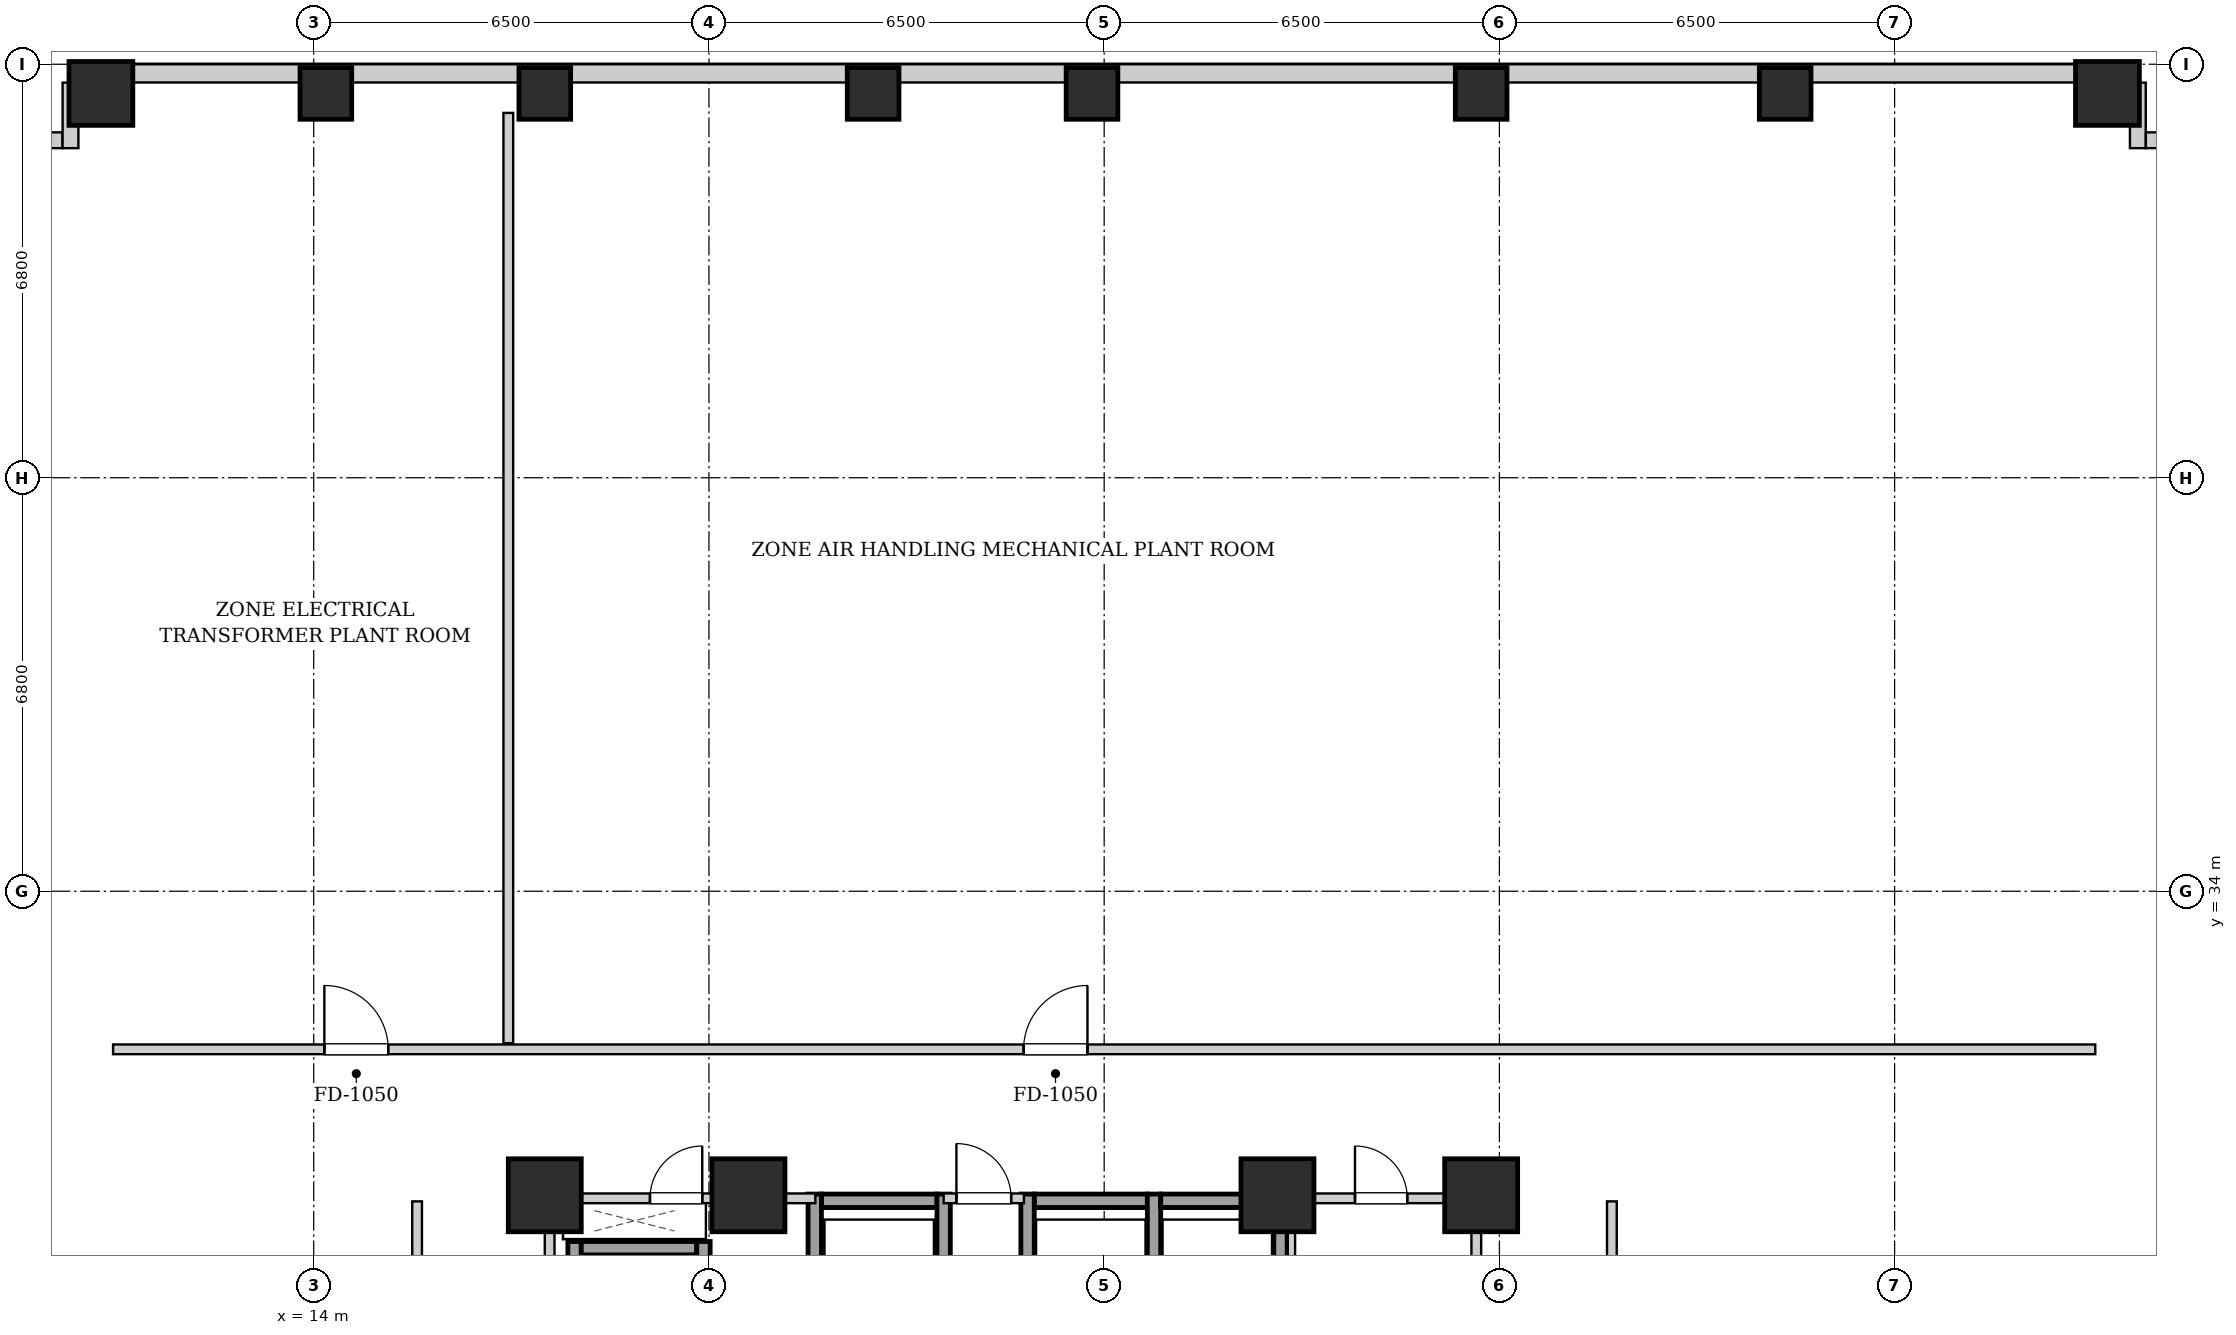
"""IFC4 building model, lengths in metres.
Left out: names, types, materials, properties, quantities, classifications, styles, units other than length and angle.
Written with IfcOpenShell. Run it as: python <this file> out.ifc"""

import sys

from ifc_helpers import new_model, si_unit, direction, frame, frame_2d, origin, origin_2d, place, context, subcontext, project, spatial, rectangle, extrude, element, fill, save


model = new_model("IFC4")
c1 = context("Model", 3, precision=1e-05, world=origin(), true_north=direction((0.0, 1.0)))
c2 = subcontext(c1, "Body", "Model", "MODEL_VIEW")
j1 = project(units=[si_unit("LENGTHUNIT", "METRE"), si_unit("PLANEANGLEUNIT", "RADIAN")], contexts=[c1])
p1 = place(None, origin())
s1 = spatial("IfcSite", under=j1, at=p1, CompositionType="ELEMENT")
p2 = place(p1, origin())
s2 = spatial("IfcBuilding", under=s1, at=p2, CompositionType="ELEMENT")
p3 = place(p2, frame((0.0, 0.0, 70.6)))
s3 = spatial("IfcBuildingStorey", under=s2, at=p3, CompositionType="ELEMENT", Elevation=70.6)
p4 = place(p3, frame((10.5, 47.12, 0.0), z_axis=(0.0, 0.0, 1.0), x_axis=(1.0, 0.0, 0.0)))
e1 = element("IfcColumn", 1, at=p4, inside=s3, PredefinedType="COLUMN", context=c2, shape_type="SweptSolid", body=[
    extrude(rectangle(XDim=1.05, YDim=1.05, at=origin_2d()), origin(), (0.0, 0.0, 1.0), 4.5),
])
for number, where, z_axis, x_axis in (
    (2, (14.2, 47.12, 0.0), (0.0, 0.0, 1.0), (1.0, 0.0, 0.0)),
    (3, (17.8, 47.12, 0.0), (0.0, 0.0, 1.0), (1.0, 0.0, 0.0)),
    (4, (23.2, 47.12, 0.0), (0.0, 0.0, 1.0), (1.0, 0.0, 0.0)),
    (5, (26.8, 47.12, 0.0), (0.0, 0.0, 1.0), (1.0, 0.0, 0.0)),
    (6, (33.2, 47.12, 0.0), (0.0, 0.0, 1.0), (1.0, 0.0, 0.0)),
    (7, (38.2, 47.12, 0.0), (0.0, 0.0, 1.0), (1.0, 0.0, 0.0)),
):
    element("IfcColumn", number, at=place(p3, frame(where, z_axis=z_axis, x_axis=x_axis)), inside=s3, PredefinedType="COLUMN", context=c2, shape_type="SweptSolid", body=[
        extrude(rectangle(XDim=0.85, YDim=0.85, at=origin_2d()), origin(), (0.0, 0.0, 1.0), 4.5),
    ])
p5 = place(p3, frame((43.5, 47.12, 0.0), z_axis=(0.0, 0.0, 1.0), x_axis=(1.0, 0.0, 0.0)))
e8 = element("IfcColumn", 8, at=p5, inside=s3, PredefinedType="COLUMN", context=c2, shape_type="SweptSolid", body=[
    extrude(rectangle(XDim=1.05, YDim=1.05, at=origin_2d()), origin(), (0.0, 0.0, 1.0), 4.5),
])
for number, where, z_axis, x_axis in (
    (9, (17.8, 29.0, 0.0), (0.0, 0.0, 1.0), (1.0, 0.0, 0.0)),
    (10, (21.15, 29.0, 0.0), (0.0, 0.0, 1.0), (1.0, 0.0, 0.0)),
    (11, (29.85, 29.0, 0.0), (0.0, 0.0, 1.0), (1.0, 0.0, 0.0)),
    (12, (33.2, 29.0, 0.0), (0.0, 0.0, 1.0), (1.0, 0.0, 0.0)),
):
    element("IfcColumn", number, at=place(p3, frame(where, z_axis=z_axis, x_axis=x_axis)), inside=s3, PredefinedType="COLUMN", context=c2, shape_type="SweptSolid", body=[
        extrude(rectangle(XDim=1.2, YDim=1.2, at=origin_2d()), origin(), (0.0, 0.0, 1.0), 4.5),
    ])
p6 = place(p3, frame((10.0, 47.45, 0.0), z_axis=(0.0, 0.0, 1.0), x_axis=(1.0, 0.0, 0.0)))
e13 = element("IfcWall", 13, at=p6, inside=s3, PredefinedType="SOLIDWALL", context=c2, shape_type="SweptSolid", body=[
    extrude(rectangle(XDim=34.0, YDim=0.3, at=frame_2d((17.0, 0.0))), origin(), (0.0, 0.0, 1.0), 2.025),
])
p7 = place(p3, frame((8.882, 46.35, 0.0), z_axis=(0.0, 0.0, 1.0), x_axis=(1.0, 0.0, 0.0)))
e14 = element("IfcWall", 14, at=p7, inside=s3, PredefinedType="SOLIDWALL", context=c2, shape_type="SweptSolid", body=[
    extrude(rectangle(XDim=0.986, YDim=0.26, at=frame_2d((0.493, 0.0))), origin(), (0.0, 0.0, 1.0), 4.24),
])
for number, where, z_axis, x_axis in (
    (15, (10.0, 46.22, 0.0), (0.0, 0.0, 1.0), (0.0, 1.0, 0.0)),
    (16, (44.0, 47.298, 0.0), (0.0, 0.0, 1.0), (0.0, -1.0, 0.0)),
):
    element("IfcWall", number, at=place(p3, frame(where, z_axis=z_axis, x_axis=x_axis)), inside=s3, PredefinedType="SOLIDWALL", context=c2, shape_type="SweptSolid", body=[
        extrude(rectangle(XDim=1.078, YDim=0.26, at=frame_2d((0.539, 0.0))), origin(), (0.0, 0.0, 1.0), 4.24),
    ])
p8 = place(p3, frame((44.132, 46.35, 0.0), z_axis=(0.0, 0.0, 1.0), x_axis=(1.0, 0.0, 0.0)))
e17 = element("IfcWall", 17, at=p8, inside=s3, PredefinedType="SOLIDWALL", context=c2, shape_type="SweptSolid", body=[
    extrude(rectangle(XDim=1.248, YDim=0.26, at=frame_2d((0.624, 0.0))), origin(), (0.0, 0.0, 1.0), 4.24),
])
p9 = place(p3, frame((22.35, 28.91, 0.0), z_axis=(0.0, 0.0, 1.0), x_axis=(1.0, 0.0, 0.0)))
e18 = element("IfcWall", 18, at=p9, inside=s3, PredefinedType="SHEAR", context=c2, shape_type="SweptSolid", body=[
    extrude(rectangle(XDim=1.9, YDim=0.22, at=frame_2d((0.95, 0.0))), origin(), (0.0, 0.0, 1.0), 4.24),
])
for number, where, z_axis, x_axis in (
    (19, (22.24, 26.58, 0.0), (0.0, 0.0, 1.0), (0.0, 1.0, 0.0)),
    (20, (24.36, 26.58, 0.0), (0.0, 0.0, 1.0), (0.0, 1.0, 0.0)),
):
    element("IfcWall", number, at=place(p3, frame(where, z_axis=z_axis, x_axis=x_axis)), inside=s3, PredefinedType="SHEAR", context=c2, shape_type="SweptSolid", body=[
        extrude(rectangle(XDim=2.44, YDim=0.22, at=frame_2d((1.22, 0.0))), origin(), (0.0, 0.0, 1.0), 4.24),
    ])
p10 = place(p3, frame((25.85, 28.91, 0.0), z_axis=(0.0, 0.0, 1.0), x_axis=(1.0, 0.0, 0.0)))
e21 = element("IfcWall", 21, at=p10, inside=s3, PredefinedType="SHEAR", context=c2, shape_type="SweptSolid", body=[
    extrude(rectangle(XDim=1.86, YDim=0.22, at=frame_2d((0.93, 0.0))), origin(), (0.0, 0.0, 1.0), 4.24),
])
for number, where, z_axis, x_axis in (
    (22, (25.74, 26.58, 0.0), (0.0, 0.0, 1.0), (0.0, 1.0, 0.0)),
    (23, (27.82, 26.58, 0.0), (0.0, 0.0, 1.0), (0.0, 1.0, 0.0)),
):
    element("IfcWall", number, at=place(p3, frame(where, z_axis=z_axis, x_axis=x_axis)), inside=s3, PredefinedType="SHEAR", context=c2, shape_type="SweptSolid", body=[
        extrude(rectangle(XDim=2.44, YDim=0.22, at=frame_2d((1.22, 0.0))), origin(), (0.0, 0.0, 1.0), 4.24),
    ])
p11 = place(p3, frame((27.93, 28.91, 0.0), z_axis=(0.0, 0.0, 1.0), x_axis=(1.0, 0.0, 0.0)))
e24 = element("IfcWall", 24, at=p11, inside=s3, PredefinedType="SHEAR", context=c2, shape_type="SweptSolid", body=[
    extrude(rectangle(XDim=1.86, YDim=0.22, at=frame_2d((0.93, 0.0))), origin(), (0.0, 0.0, 1.0), 4.24),
])
p12 = place(p3, frame((29.9, 26.58, 0.0), z_axis=(0.0, 0.0, 1.0), x_axis=(0.0, 1.0, 0.0)))
e25 = element("IfcWall", 25, at=p12, inside=s3, PredefinedType="SHEAR", context=c2, shape_type="SweptSolid", body=[
    extrude(rectangle(XDim=2.44, YDim=0.22, at=frame_2d((1.22, 0.0))), origin(), (0.0, 0.0, 1.0), 4.24),
])
p13 = place(p3, frame((18.29, 24.1, 0.0), z_axis=(0.0, 0.0, 1.0), x_axis=(0.0, 1.0, 0.0)))
e26 = element("IfcWall", 26, at=p13, inside=s3, PredefinedType="SHEAR", context=c2, shape_type="SweptSolid", body=[
    extrude(rectangle(XDim=4.14, YDim=0.22, at=frame_2d((2.07, 0.0))), origin(), (0.0, 0.0, 1.0), 4.24),
])
p14 = place(p3, frame((18.4, 28.13, 0.0), z_axis=(0.0, 0.0, 1.0), x_axis=(1.0, 0.0, 0.0)))
e27 = element("IfcWall", 27, at=p14, inside=s3, PredefinedType="SHEAR", context=c2, shape_type="SweptSolid", body=[
    extrude(rectangle(XDim=1.9, YDim=0.22, at=frame_2d((0.95, 0.0))), origin(), (0.0, 0.0, 1.0), 4.24),
])
p15 = place(p3, frame((20.41, 26.06, 0.0), z_axis=(0.0, 0.0, 1.0), x_axis=(0.0, 1.0, 0.0)))
e28 = element("IfcWall", 28, at=p15, inside=s3, PredefinedType="SHEAR", context=c2, shape_type="SweptSolid", body=[
    extrude(rectangle(XDim=2.18, YDim=0.22, at=frame_2d((1.09, 0.0))), origin(), (0.0, 0.0, 1.0), 4.24),
])
for number, where, z_axis, x_axis in (
    (29, (17.88, 24.12, 0.0), (0.0, 0.0, 1.0), (0.0, 1.0, 0.0)),
    (30, (33.12, 24.12, 0.0), (0.0, 0.0, 1.0), (0.0, 1.0, 0.0)),
):
    element("IfcWall", number, at=place(p3, frame(where, z_axis=z_axis, x_axis=x_axis)), inside=s3, PredefinedType="PARTITIONING", context=c2, shape_type="SweptSolid", body=[
        extrude(rectangle(XDim=4.76, YDim=0.16, at=frame_2d((2.38, 0.0))), origin(), (0.0, 0.0, 1.0), 4.24),
    ])
p16 = place(p3, frame((24.36, 28.95, 0.0), z_axis=(0.0, 0.0, 1.0), x_axis=(1.0, 0.0, 0.0)))
e31 = element("IfcWall", 31, at=p16, inside=s3, PredefinedType="PARTITIONING", context=c2, shape_type="SweptSolid", body=[
    extrude(rectangle(XDim=1.32, YDim=0.16, at=frame_2d((0.66, 0.0))), origin(), (0.0, 0.0, 1.0), 4.24),
])
p17 = place(p16, frame((0.21, 0.0, 0.0)))
e32 = element("IfcOpeningElement", 32, at=p17, cuts=e31, PredefinedType="OPENING", context=c2, shape_type="SweptSolid", body=[
    extrude(rectangle(XDim=0.9, YDim=2.05, at=frame_2d((0.45, 1.025))), frame((0.0, 0.09, 0.0), z_axis=(0.0, -1.0, 0.0), x_axis=(1.0, 0.0, 0.0)), (0.0, 0.0, 1.0), 0.18),
])
p18 = place(p3, frame((17.96, 28.95, 0.0), z_axis=(0.0, 0.0, 1.0), x_axis=(1.0, 0.0, 0.0)))
e33 = element("IfcWall", 33, at=p18, inside=s3, PredefinedType="PARTITIONING", context=c2, shape_type="SweptSolid", body=[
    extrude(rectangle(XDim=4.29, YDim=0.16, at=frame_2d((2.145, 0.0))), origin(), (0.0, 0.0, 1.0), 4.24),
])
p19 = place(p18, frame((1.57, 0.0, 0.0)))
e34 = element("IfcOpeningElement", 34, at=p19, cuts=e33, PredefinedType="OPENING", context=c2, shape_type="SweptSolid", body=[
    extrude(rectangle(XDim=0.86, YDim=2.05, at=frame_2d((0.43, 1.025))), frame((0.0, 0.09, 0.0), z_axis=(0.0, -1.0, 0.0), x_axis=(1.0, 0.0, 0.0)), (0.0, 0.0, 1.0), 0.18),
])
p20 = place(p3, frame((30.08, 26.18, 0.0), z_axis=(0.0, 0.0, 1.0), x_axis=(0.0, 1.0, 0.0)))
e35 = element("IfcWall", 35, at=p20, inside=s3, PredefinedType="PARTITIONING", context=c2, shape_type="SweptSolid", body=[
    extrude(rectangle(XDim=2.68, YDim=0.12, at=frame_2d((1.34, 0.0))), origin(), (0.0, 0.0, 1.0), 4.24),
])
p21 = place(p3, frame((30.08, 28.95, 0.0), z_axis=(0.0, 0.0, 1.0), x_axis=(1.0, 0.0, 0.0)))
e36 = element("IfcWall", 36, at=p21, inside=s3, PredefinedType="PARTITIONING", context=c2, shape_type="SweptSolid", body=[
    extrude(rectangle(XDim=2.96, YDim=0.16, at=frame_2d((1.48, 0.0))), origin(), (0.0, 0.0, 1.0), 4.24),
])
p22 = place(p21, frame((1.045, 0.0, 0.0)))
e37 = element("IfcOpeningElement", 37, at=p22, cuts=e36, PredefinedType="OPENING", context=c2, shape_type="SweptSolid", body=[
    extrude(rectangle(XDim=0.86, YDim=2.05, at=frame_2d((0.43, 1.025))), frame((0.0, 0.09, 0.0), z_axis=(0.0, -1.0, 0.0), x_axis=(1.0, 0.0, 0.0)), (0.0, 0.0, 1.0), 0.18),
])
p23 = place(p3, frame((10.7, 31.4, 0.0), z_axis=(0.0, 0.0, 1.0), x_axis=(1.0, 0.0, 0.0)))
e38 = element("IfcWall", 38, at=p23, inside=s3, PredefinedType="PARTITIONING", context=c2, shape_type="SweptSolid", body=[
    extrude(rectangle(XDim=32.6, YDim=0.16, at=frame_2d((16.3, 0.0))), origin(), (0.0, 0.0, 1.0), 4.24),
])
p24 = place(p23, frame((3.475, 0.0, 0.0)))
e39 = element("IfcOpeningElement", 39, at=p24, cuts=e38, PredefinedType="OPENING", context=c2, shape_type="SweptSolid", body=[
    extrude(rectangle(XDim=1.05, YDim=2.05, at=frame_2d((0.525, 1.025))), frame((0.0, 0.09, 0.0), z_axis=(0.0, -1.0, 0.0), x_axis=(1.0, 0.0, 0.0)), (0.0, 0.0, 1.0), 0.18),
])
p25 = place(p23, frame((14.975, 0.0, 0.0)))
e40 = element("IfcOpeningElement", 40, at=p25, cuts=e38, PredefinedType="OPENING", context=c2, shape_type="SweptSolid", body=[
    extrude(rectangle(XDim=1.05, YDim=2.05, at=frame_2d((0.525, 1.025))), frame((0.0, 0.09, 0.0), z_axis=(0.0, -1.0, 0.0), x_axis=(1.0, 0.0, 0.0)), (0.0, 0.0, 1.0), 0.18),
])
p26 = place(p3, frame((17.2, 31.5, 0.0), z_axis=(0.0, 0.0, 1.0), x_axis=(0.0, 1.0, 0.0)))
e41 = element("IfcWall", 41, at=p26, inside=s3, PredefinedType="PARTITIONING", context=c2, shape_type="SweptSolid", body=[
    extrude(rectangle(XDim=15.3, YDim=0.16, at=frame_2d((7.65, 0.0))), origin(), (0.0, 0.0, 1.0), 2.025),
])
p27 = place(p3, frame((15.7, 15.1, 0.0), z_axis=(0.0, 0.0, 1.0), x_axis=(0.0, 1.0, 0.0)))
e42 = element("IfcWall", 42, at=p27, inside=s3, PredefinedType="PARTITIONING", context=c2, shape_type="SweptSolid", body=[
    extrude(rectangle(XDim=13.8, YDim=0.16, at=frame_2d((6.9, 0.0))), origin(), (0.0, 0.0, 1.0), 4.24),
])
p28 = place(p27, frame((6.475, 0.0, 0.0)))
e43 = element("IfcOpeningElement", 43, at=p28, cuts=e42, PredefinedType="OPENING", context=c2, shape_type="SweptSolid", body=[
    extrude(rectangle(XDim=1.05, YDim=2.05, at=frame_2d((0.525, 1.025))), frame((0.0, 0.09, 0.0), z_axis=(0.0, -1.0, 0.0), x_axis=(1.0, 0.0, 0.0)), (0.0, 0.0, 1.0), 0.18),
])
p29 = place(p3, frame((35.35, 15.1, 0.0), z_axis=(0.0, 0.0, 1.0), x_axis=(0.0, 1.0, 0.0)))
e44 = element("IfcWall", 44, at=p29, inside=s3, PredefinedType="PARTITIONING", context=c2, shape_type="SweptSolid", body=[
    extrude(rectangle(XDim=13.8, YDim=0.16, at=frame_2d((6.9, 0.0))), origin(), (0.0, 0.0, 1.0), 4.24),
])
p30 = place(p29, frame((6.475, 0.0, 0.0)))
e45 = element("IfcOpeningElement", 45, at=p30, cuts=e44, PredefinedType="OPENING", context=c2, shape_type="SweptSolid", body=[
    extrude(rectangle(XDim=1.05, YDim=2.05, at=frame_2d((0.525, 1.025))), frame((0.0, 0.09, 0.0), z_axis=(0.0, -1.0, 0.0), x_axis=(1.0, 0.0, 0.0)), (0.0, 0.0, 1.0), 0.18),
])
p31 = place(p17, origin())
e46 = element("IfcDoor", 46, at=p31, inside=s3, OperationType="SINGLE_SWING_LEFT", PredefinedType="DOOR", context=c2, shape_type="SweptSolid", body=[
    extrude(rectangle(XDim=0.9, YDim=2.05, at=frame_2d((0.45, 1.025))), frame((0.0, 0.025, 0.0), z_axis=(0.0, -1.0, 0.0), x_axis=(1.0, 0.0, 0.0)), (0.0, 0.0, 1.0), 0.05),
])
fill(e32, e46)
p32 = place(p19, origin())
e47 = element("IfcDoor", 47, at=p32, inside=s3, OperationType="SINGLE_SWING_RIGHT", PredefinedType="DOOR", context=c2, shape_type="SweptSolid", body=[
    extrude(rectangle(XDim=0.86, YDim=2.05, at=frame_2d((0.43, 1.025))), frame((0.0, 0.025, 0.0), z_axis=(0.0, -1.0, 0.0), x_axis=(1.0, 0.0, 0.0)), (0.0, 0.0, 1.0), 0.05),
])
fill(e34, e47)
p33 = place(p22, origin())
e48 = element("IfcDoor", 48, at=p33, inside=s3, OperationType="SINGLE_SWING_LEFT", PredefinedType="DOOR", context=c2, shape_type="SweptSolid", body=[
    extrude(rectangle(XDim=0.86, YDim=2.05, at=frame_2d((0.43, 1.025))), frame((0.0, 0.025, 0.0), z_axis=(0.0, -1.0, 0.0), x_axis=(1.0, 0.0, 0.0)), (0.0, 0.0, 1.0), 0.05),
])
fill(e37, e48)
p34 = place(p24, origin())
e49 = element("IfcDoor", 49, at=p34, inside=s3, OperationType="SINGLE_SWING_LEFT", PredefinedType="DOOR", context=c2, shape_type="SweptSolid", body=[
    extrude(rectangle(XDim=1.05, YDim=2.05, at=frame_2d((0.525, 1.025))), frame((0.0, 0.025, 0.0), z_axis=(0.0, -1.0, 0.0), x_axis=(1.0, 0.0, 0.0)), (0.0, 0.0, 1.0), 0.05),
])
fill(e39, e49)
p35 = place(p25, origin())
e50 = element("IfcDoor", 50, at=p35, inside=s3, OperationType="SINGLE_SWING_RIGHT", PredefinedType="DOOR", context=c2, shape_type="SweptSolid", body=[
    extrude(rectangle(XDim=1.05, YDim=2.05, at=frame_2d((0.525, 1.025))), frame((0.0, 0.025, 0.0), z_axis=(0.0, -1.0, 0.0), x_axis=(1.0, 0.0, 0.0)), (0.0, 0.0, 1.0), 0.05),
])
fill(e40, e50)
save(model, sys.argv[1])
